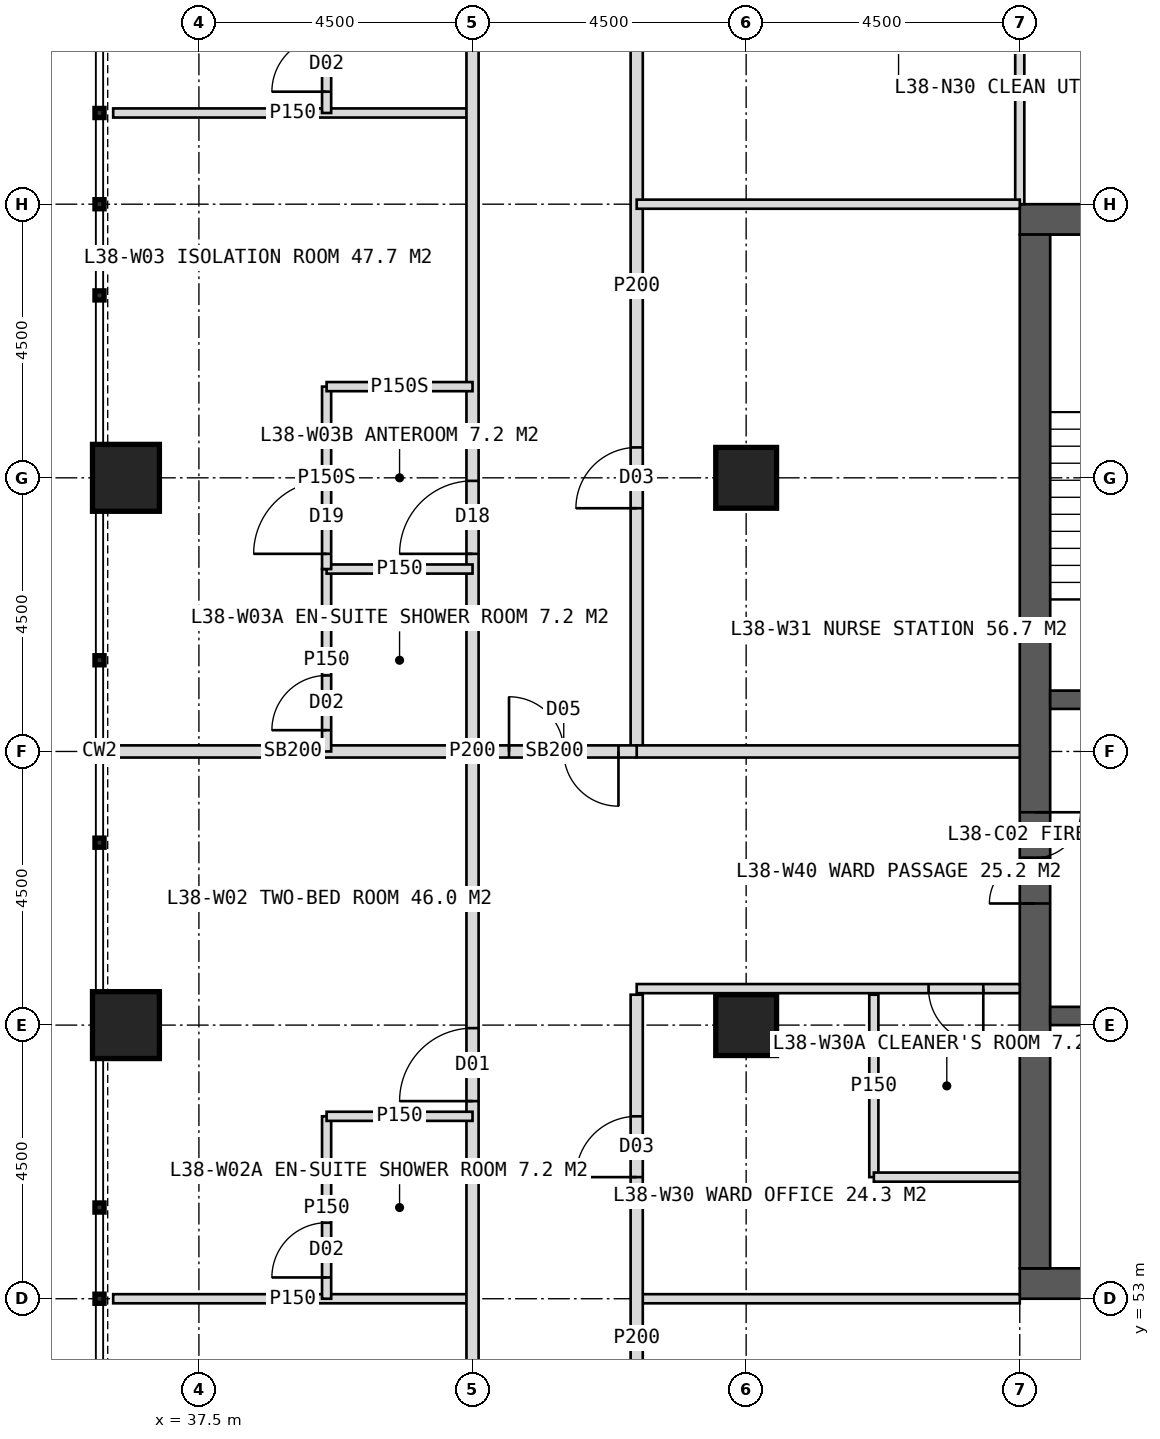
"""IFC4 building model, lengths in metres.
Left out: names, types, materials, properties, quantities, classifications, styles, units other than length and angle.
Written with IfcOpenShell. Run it as: python <this file> out.ifc"""

import sys

from ifc_helpers import new_model, si_unit, direction, frame, frame_2d, origin, origin_2d, place, context, subcontext, project, spatial, rectangle, hollow_rectangle, extrude, element, fill, save


model = new_model("IFC4")
c1 = context("Model", 3, precision=1e-05, world=origin(), true_north=direction((0.0, 1.0)))
c2 = subcontext(c1, "Body", "Model", "MODEL_VIEW")
j1 = project(units=[si_unit("LENGTHUNIT", "METRE"), si_unit("PLANEANGLEUNIT", "RADIAN")], contexts=[c1])
p1 = place(None, origin())
s1 = spatial("IfcSite", under=j1, at=p1, CompositionType="ELEMENT")
p2 = place(p1, origin())
s2 = spatial("IfcBuilding", under=s1, at=p2, CompositionType="ELEMENT")
p3 = place(p2, frame((0.0, 0.0, 160.0)))
s3 = spatial("IfcBuildingStorey", under=s2, at=p3, CompositionType="ELEMENT", Elevation=160.0)
p4 = place(p3, frame((51.0, 70.75, 0.0), z_axis=(0.0, 0.0, 1.0), x_axis=(1.0, 0.0, 0.0)))
e1 = element("IfcWall", 1, at=p4, inside=s3, PredefinedType="SHEAR", context=c2, shape_type="SweptSolid", body=[
    extrude(rectangle(XDim=18.0, YDim=0.5, at=frame_2d((9.0, 0.0))), origin(), (0.0, 0.0, 1.0), 4.0),
])
p5 = place(p4, frame((8.1, 0.0, 0.0)))
e2 = element("IfcOpeningElement", 2, at=p5, cuts=e1, PredefinedType="OPENING", context=c2, shape_type="SweptSolid", body=[
    extrude(rectangle(XDim=1.8, YDim=2.2, at=frame_2d((0.9, 1.1))), frame((0.0, 0.26, 0.0), z_axis=(0.0, -1.0, 0.0), x_axis=(1.0, 0.0, 0.0)), (0.0, 0.0, 1.0), 0.52),
])
p6 = place(p3, frame((51.0, 53.25, 0.0), z_axis=(0.0, 0.0, 1.0), x_axis=(1.0, 0.0, 0.0)))
e3 = element("IfcWall", 3, at=p6, inside=s3, PredefinedType="SHEAR", context=c2, shape_type="SweptSolid", body=[
    extrude(rectangle(XDim=18.0, YDim=0.5, at=frame_2d((9.0, 0.0))), origin(), (0.0, 0.0, 1.0), 4.0),
])
p7 = place(p6, frame((8.1, 0.0, 0.0)))
e4 = element("IfcOpeningElement", 4, at=p7, cuts=e3, PredefinedType="OPENING", context=c2, shape_type="SweptSolid", body=[
    extrude(rectangle(XDim=1.8, YDim=2.2, at=frame_2d((0.9, 1.1))), frame((0.0, 0.26, 0.0), z_axis=(0.0, -1.0, 0.0), x_axis=(1.0, 0.0, 0.0)), (0.0, 0.0, 1.0), 0.52),
])
p8 = place(p3, frame((51.25, 53.5, 0.0), z_axis=(0.0, 0.0, 1.0), x_axis=(0.0, 1.0, 0.0)))
e5 = element("IfcWall", 5, at=p8, inside=s3, PredefinedType="SHEAR", context=c2, shape_type="SweptSolid", body=[
    extrude(rectangle(XDim=17.0, YDim=0.5, at=frame_2d((8.5, 0.0))), origin(), (0.0, 0.0, 1.0), 4.0),
])
p9 = place(p8, frame((6.0, 0.0, 0.0)))
e6 = element("IfcOpeningElement", 6, at=p9, cuts=e5, PredefinedType="OPENING", context=c2, shape_type="SweptSolid", body=[
    extrude(rectangle(XDim=1.5, YDim=2.2, at=frame_2d((0.75, 1.1))), frame((0.0, 0.26, 0.0), z_axis=(0.0, -1.0, 0.0), x_axis=(1.0, 0.0, 0.0)), (0.0, 0.0, 1.0), 0.52),
])
p10 = place(p3, frame((51.5, 62.85, 0.0), z_axis=(0.0, 0.0, 1.0), x_axis=(1.0, 0.0, 0.0)))
e7 = element("IfcWall", 7, at=p10, inside=s3, PredefinedType="SHEAR", context=c2, shape_type="SweptSolid", body=[
    extrude(rectangle(XDim=3.3, YDim=0.3, at=frame_2d((1.65, 0.0))), origin(), (0.0, 0.0, 1.0), 4.0),
])
p11 = place(p10, frame((1.05, 0.0, 0.0)))
e8 = element("IfcOpeningElement", 8, at=p11, cuts=e7, PredefinedType="OPENING", context=c2, shape_type="SweptSolid", body=[
    extrude(rectangle(XDim=1.2, YDim=2.1, at=frame_2d((0.6, 1.05))), frame((0.0, 0.16, 0.0), z_axis=(0.0, -1.0, 0.0), x_axis=(1.0, 0.0, 0.0)), (0.0, 0.0, 1.0), 0.32),
])
p12 = place(p3, frame((51.5, 57.65, 0.0), z_axis=(0.0, 0.0, 1.0), x_axis=(1.0, 0.0, 0.0)))
e9 = element("IfcWall", 9, at=p12, inside=s3, PredefinedType="SHEAR", context=c2, shape_type="SweptSolid", body=[
    extrude(rectangle(XDim=3.3, YDim=0.3, at=frame_2d((1.65, 0.0))), origin(), (0.0, 0.0, 1.0), 4.0),
])
p13 = place(p12, frame((1.05, 0.0, 0.0)))
e10 = element("IfcOpeningElement", 10, at=p13, cuts=e9, PredefinedType="OPENING", context=c2, shape_type="SweptSolid", body=[
    extrude(rectangle(XDim=1.2, YDim=2.2, at=frame_2d((0.6, 1.1))), frame((0.0, 0.16, 0.0), z_axis=(0.0, -1.0, 0.0), x_axis=(1.0, 0.0, 0.0)), (0.0, 0.0, 1.0), 0.32),
])
for number, where, z_axis, x_axis in (
    (11, (46.5, 57.5, 0.0), (0.0, 0.0, 1.0), (1.0, 0.0, 0.0)),
    (12, (46.5, 66.5, 0.0), (0.0, 0.0, 1.0), (1.0, 0.0, 0.0)),
):
    element("IfcColumn", number, at=place(p3, frame(where, z_axis=z_axis, x_axis=x_axis)), inside=s3, PredefinedType="COLUMN", context=c2, shape_type="SweptSolid", body=[
        extrude(hollow_rectangle(XDim=1.0, YDim=1.0, WallThickness=0.1, at=origin_2d()), origin(), (0.0, 0.0, 1.0), 4.0),
    ])
for number, where, z_axis, x_axis in (
    (13, (36.3, 57.5, 0.0), (0.0, 0.0, 1.0), (1.0, 0.0, 0.0)),
    (14, (36.3, 66.5, 0.0), (0.0, 0.0, 1.0), (1.0, 0.0, 0.0)),
):
    element("IfcColumn", number, at=place(p3, frame(where, z_axis=z_axis, x_axis=x_axis)), inside=s3, PredefinedType="COLUMN", context=c2, shape_type="SweptSolid", body=[
        extrude(hollow_rectangle(XDim=1.1, YDim=1.1, WallThickness=0.1, at=origin_2d()), origin(), (0.0, 0.0, 1.0), 4.0),
    ])
p14 = place(p3, frame((51.0, 71.0, 0.0), z_axis=(0.0, 0.0, 1.0), x_axis=(0.0, 1.0, 0.0)))
e15 = element("IfcWall", 15, at=p14, inside=s3, PredefinedType="PARTITIONING", context=c2, shape_type="SweptSolid", body=[
    extrude(rectangle(XDim=6.3, YDim=0.15, at=frame_2d((3.15, 0.0))), origin(), (0.0, 0.0, 1.0), 3.75),
])
p15 = place(p3, frame((42.0, 53.0, 0.0), z_axis=(0.0, 0.0, 1.0), x_axis=(-1.0, 0.0, 0.0)))
e16 = element("IfcWall", 16, at=p15, inside=s3, PredefinedType="PARTITIONING", context=c2, shape_type="SweptSolid", body=[
    extrude(rectangle(XDim=5.91, YDim=0.15, at=frame_2d((2.955, 0.0))), origin(), (0.0, 0.0, 1.0), 3.75),
])
p16 = place(p3, frame((42.0, 62.0, 0.0), z_axis=(0.0, 0.0, 1.0), x_axis=(-1.0, 0.0, 0.0)))
e17 = element("IfcWall", 17, at=p16, inside=s3, PredefinedType="SOLIDWALL", context=c2, shape_type="SweptSolid", body=[
    extrude(rectangle(XDim=5.91, YDim=0.2, at=frame_2d((2.955, 0.0))), origin(), (0.0, 0.0, 1.0), 2.95),
])
p17 = place(p3, frame((42.0, 72.5, 0.0), z_axis=(0.0, 0.0, 1.0), x_axis=(-1.0, 0.0, 0.0)))
e18 = element("IfcWall", 18, at=p17, inside=s3, PredefinedType="PARTITIONING", context=c2, shape_type="SweptSolid", body=[
    extrude(rectangle(XDim=5.91, YDim=0.15, at=frame_2d((2.955, 0.0))), origin(), (0.0, 0.0, 1.0), 3.75),
])
p18 = place(p3, frame((42.0, 44.0, 0.0), z_axis=(0.0, 0.0, 1.0), x_axis=(0.0, 1.0, 0.0)))
e19 = element("IfcWall", 19, at=p18, inside=s3, PredefinedType="PARTITIONING", context=c2, shape_type="SweptSolid", body=[
    extrude(rectangle(XDim=36.0, YDim=0.2, at=frame_2d((18.0, 0.0))), origin(), (0.0, 0.0, 1.0), 3.75),
])
p19 = place(p18, frame((3.25, 0.0, 0.0)))
e20 = element("IfcOpeningElement", 20, at=p19, cuts=e19, PredefinedType="OPENING", context=c2, shape_type="SweptSolid", body=[
    extrude(rectangle(XDim=1.2, YDim=2.2, at=frame_2d((0.6, 1.1))), frame((0.0, 0.11, 0.0), z_axis=(0.0, -1.0, 0.0), x_axis=(1.0, 0.0, 0.0)), (0.0, 0.0, 1.0), 0.22),
])
p20 = place(p18, frame((12.25, 0.0, 0.0)))
e21 = element("IfcOpeningElement", 21, at=p20, cuts=e19, PredefinedType="OPENING", context=c2, shape_type="SweptSolid", body=[
    extrude(rectangle(XDim=1.2, YDim=2.2, at=frame_2d((0.6, 1.1))), frame((0.0, 0.11, 0.0), z_axis=(0.0, -1.0, 0.0), x_axis=(1.0, 0.0, 0.0)), (0.0, 0.0, 1.0), 0.22),
])
p21 = place(p18, frame((21.25, 0.0, 0.0)))
e22 = element("IfcOpeningElement", 22, at=p21, cuts=e19, PredefinedType="OPENING", context=c2, shape_type="SweptSolid", body=[
    extrude(rectangle(XDim=1.2, YDim=2.2, at=frame_2d((0.6, 1.1))), frame((0.0, 0.11, 0.0), z_axis=(0.0, -1.0, 0.0), x_axis=(1.0, 0.0, 0.0)), (0.0, 0.0, 1.0), 0.22),
])
p22 = place(p18, frame((31.75, 0.0, 0.0)))
e23 = element("IfcOpeningElement", 23, at=p22, cuts=e19, PredefinedType="OPENING", context=c2, shape_type="SweptSolid", body=[
    extrude(rectangle(XDim=1.2, YDim=2.2, at=frame_2d((0.6, 1.1))), frame((0.0, 0.11, 0.0), z_axis=(0.0, -1.0, 0.0), x_axis=(1.0, 0.0, 0.0)), (0.0, 0.0, 1.0), 0.22),
])
p23 = place(p3, frame((39.6, 53.0, 0.0), z_axis=(0.0, 0.0, 1.0), x_axis=(0.0, 1.0, 0.0)))
e24 = element("IfcWall", 24, at=p23, inside=s3, PredefinedType="PARTITIONING", context=c2, shape_type="SweptSolid", body=[
    extrude(rectangle(XDim=3.0, YDim=0.15, at=frame_2d((1.5, 0.0))), origin(), (0.0, 0.0, 1.0), 3.75),
])
p24 = place(p23, frame((0.35, 0.0, 0.0)))
e25 = element("IfcOpeningElement", 25, at=p24, cuts=e24, PredefinedType="OPENING", context=c2, shape_type="SweptSolid", body=[
    extrude(rectangle(XDim=0.9, YDim=2.1, at=frame_2d((0.45, 1.05))), frame((0.0, 0.085, 0.0), z_axis=(0.0, -1.0, 0.0), x_axis=(1.0, 0.0, 0.0)), (0.0, 0.0, 1.0), 0.17),
])
p25 = place(p3, frame((42.0, 56.0, 0.0), z_axis=(0.0, 0.0, 1.0), x_axis=(-1.0, 0.0, 0.0)))
e26 = element("IfcWall", 26, at=p25, inside=s3, PredefinedType="PARTITIONING", context=c2, shape_type="SweptSolid", body=[
    extrude(rectangle(XDim=2.4, YDim=0.15, at=frame_2d((1.2, 0.0))), origin(), (0.0, 0.0, 1.0), 3.75),
])
p26 = place(p3, frame((39.6, 62.0, 0.0), z_axis=(0.0, 0.0, 1.0), x_axis=(0.0, 1.0, 0.0)))
e27 = element("IfcWall", 27, at=p26, inside=s3, PredefinedType="PARTITIONING", context=c2, shape_type="SweptSolid", body=[
    extrude(rectangle(XDim=3.0, YDim=0.15, at=frame_2d((1.5, 0.0))), origin(), (0.0, 0.0, 1.0), 3.75),
])
p27 = place(p26, frame((0.35, 0.0, 0.0)))
e28 = element("IfcOpeningElement", 28, at=p27, cuts=e27, PredefinedType="OPENING", context=c2, shape_type="SweptSolid", body=[
    extrude(rectangle(XDim=0.9, YDim=2.1, at=frame_2d((0.45, 1.05))), frame((0.0, 0.085, 0.0), z_axis=(0.0, -1.0, 0.0), x_axis=(1.0, 0.0, 0.0)), (0.0, 0.0, 1.0), 0.17),
])
p28 = place(p3, frame((42.0, 65.0, 0.0), z_axis=(0.0, 0.0, 1.0), x_axis=(-1.0, 0.0, 0.0)))
e29 = element("IfcWall", 29, at=p28, inside=s3, PredefinedType="PARTITIONING", context=c2, shape_type="SweptSolid", body=[
    extrude(rectangle(XDim=2.4, YDim=0.15, at=frame_2d((1.2, 0.0))), origin(), (0.0, 0.0, 1.0), 3.75),
])
p29 = place(p3, frame((39.6, 65.0, 0.0), z_axis=(0.0, 0.0, 1.0), x_axis=(0.0, 1.0, 0.0)))
e30 = element("IfcWall", 30, at=p29, inside=s3, PredefinedType="PARTITIONING", context=c2, shape_type="SweptSolid", body=[
    extrude(rectangle(XDim=3.0, YDim=0.15, at=frame_2d((1.5, 0.0))), origin(), (0.0, 0.0, 1.0), 3.75),
])
p30 = place(p29, frame((0.25, 0.0, 0.0)))
e31 = element("IfcOpeningElement", 31, at=p30, cuts=e30, PredefinedType="OPENING", context=c2, shape_type="SweptSolid", body=[
    extrude(rectangle(XDim=1.2, YDim=2.2, at=frame_2d((0.6, 1.1))), frame((0.0, 0.085, 0.0), z_axis=(0.0, -1.0, 0.0), x_axis=(1.0, 0.0, 0.0)), (0.0, 0.0, 1.0), 0.17),
])
p31 = place(p3, frame((42.0, 68.0, 0.0), z_axis=(0.0, 0.0, 1.0), x_axis=(-1.0, 0.0, 0.0)))
e32 = element("IfcWall", 32, at=p31, inside=s3, PredefinedType="PARTITIONING", context=c2, shape_type="SweptSolid", body=[
    extrude(rectangle(XDim=2.4, YDim=0.15, at=frame_2d((1.2, 0.0))), origin(), (0.0, 0.0, 1.0), 3.75),
])
p32 = place(p3, frame((39.6, 72.5, 0.0), z_axis=(0.0, 0.0, 1.0), x_axis=(0.0, 1.0, 0.0)))
e33 = element("IfcWall", 33, at=p32, inside=s3, PredefinedType="PARTITIONING", context=c2, shape_type="SweptSolid", body=[
    extrude(rectangle(XDim=3.0, YDim=0.15, at=frame_2d((1.5, 0.0))), origin(), (0.0, 0.0, 1.0), 3.75),
])
p33 = place(p32, frame((0.35, 0.0, 0.0)))
e34 = element("IfcOpeningElement", 34, at=p33, cuts=e33, PredefinedType="OPENING", context=c2, shape_type="SweptSolid", body=[
    extrude(rectangle(XDim=0.9, YDim=2.1, at=frame_2d((0.45, 1.05))), frame((0.0, 0.085, 0.0), z_axis=(0.0, -1.0, 0.0), x_axis=(1.0, 0.0, 0.0)), (0.0, 0.0, 1.0), 0.17),
])
p34 = place(p3, frame((51.0, 53.0, 0.0), z_axis=(0.0, 0.0, 1.0), x_axis=(-1.0, 0.0, 0.0)))
e35 = element("IfcWall", 35, at=p34, inside=s3, PredefinedType="PARTITIONING", context=c2, shape_type="SweptSolid", body=[
    extrude(rectangle(XDim=6.3, YDim=0.15, at=frame_2d((3.15, 0.0))), origin(), (0.0, 0.0, 1.0), 3.75),
])
p35 = place(p3, frame((44.7, 46.7, 0.0), z_axis=(0.0, 0.0, 1.0), x_axis=(0.0, 1.0, 0.0)))
e36 = element("IfcWall", 36, at=p35, inside=s3, PredefinedType="PARTITIONING", context=c2, shape_type="SweptSolid", body=[
    extrude(rectangle(XDim=11.3, YDim=0.2, at=frame_2d((5.65, 0.0))), origin(), (0.0, 0.0, 1.0), 3.75),
])
p36 = place(p35, frame((8.3, 0.0, 0.0)))
e37 = element("IfcOpeningElement", 37, at=p36, cuts=e36, PredefinedType="OPENING", context=c2, shape_type="SweptSolid", body=[
    extrude(rectangle(XDim=1.0, YDim=2.1, at=frame_2d((0.5, 1.05))), frame((0.0, 0.11, 0.0), z_axis=(0.0, -1.0, 0.0), x_axis=(1.0, 0.0, 0.0)), (0.0, 0.0, 1.0), 0.22),
])
p37 = place(p3, frame((44.7, 62.0, 0.0), z_axis=(0.0, 0.0, 1.0), x_axis=(0.0, 1.0, 0.0)))
e38 = element("IfcWall", 38, at=p37, inside=s3, PredefinedType="PARTITIONING", context=c2, shape_type="SweptSolid", body=[
    extrude(rectangle(XDim=15.3, YDim=0.2, at=frame_2d((7.65, 0.0))), origin(), (0.0, 0.0, 1.0), 3.75),
])
p38 = place(p37, frame((4.0, 0.0, 0.0)))
e39 = element("IfcOpeningElement", 39, at=p38, cuts=e38, PredefinedType="OPENING", context=c2, shape_type="SweptSolid", body=[
    extrude(rectangle(XDim=1.0, YDim=2.1, at=frame_2d((0.5, 1.05))), frame((0.0, 0.11, 0.0), z_axis=(0.0, -1.0, 0.0), x_axis=(1.0, 0.0, 0.0)), (0.0, 0.0, 1.0), 0.22),
])
p39 = place(p37, frame((11.65, 0.0, 0.0)))
e40 = element("IfcOpeningElement", 40, at=p39, cuts=e38, PredefinedType="OPENING", context=c2, shape_type="SweptSolid", body=[
    extrude(rectangle(XDim=1.0, YDim=2.1, at=frame_2d((0.5, 1.05))), frame((0.0, 0.11, 0.0), z_axis=(0.0, -1.0, 0.0), x_axis=(1.0, 0.0, 0.0)), (0.0, 0.0, 1.0), 0.22),
])
p40 = place(p3, frame((51.0, 58.1, 0.0), z_axis=(0.0, 0.0, 1.0), x_axis=(-1.0, 0.0, 0.0)))
e41 = element("IfcWall", 41, at=p40, inside=s3, PredefinedType="PARTITIONING", context=c2, shape_type="SweptSolid", body=[
    extrude(rectangle(XDim=6.3, YDim=0.15, at=frame_2d((3.15, 0.0))), origin(), (0.0, 0.0, 1.0), 3.75),
])
p41 = place(p40, frame((0.6, 0.0, 0.0)))
e42 = element("IfcOpeningElement", 42, at=p41, cuts=e41, PredefinedType="OPENING", context=c2, shape_type="SweptSolid", body=[
    extrude(rectangle(XDim=0.9, YDim=2.1, at=frame_2d((0.45, 1.05))), frame((0.0, 0.085, 0.0), z_axis=(0.0, -1.0, 0.0), x_axis=(1.0, 0.0, 0.0)), (0.0, 0.0, 1.0), 0.17),
])
p42 = place(p3, frame((51.0, 62.0, 0.0), z_axis=(0.0, 0.0, 1.0), x_axis=(-1.0, 0.0, 0.0)))
e43 = element("IfcWall", 43, at=p42, inside=s3, PredefinedType="SOLIDWALL", context=c2, shape_type="SweptSolid", body=[
    extrude(rectangle(XDim=6.3, YDim=0.2, at=frame_2d((3.15, 0.0))), origin(), (0.0, 0.0, 1.0), 2.95),
])
p43 = place(p3, frame((51.0, 71.0, 0.0), z_axis=(0.0, 0.0, 1.0), x_axis=(-1.0, 0.0, 0.0)))
e44 = element("IfcWall", 44, at=p43, inside=s3, PredefinedType="PARTITIONING", context=c2, shape_type="SweptSolid", body=[
    extrude(rectangle(XDim=6.3, YDim=0.15, at=frame_2d((3.15, 0.0))), origin(), (0.0, 0.0, 1.0), 3.75),
])
p44 = place(p3, frame((48.6, 55.0, 0.0), z_axis=(0.0, 0.0, 1.0), x_axis=(0.0, 1.0, 0.0)))
e45 = element("IfcWall", 45, at=p44, inside=s3, PredefinedType="PARTITIONING", context=c2, shape_type="SweptSolid", body=[
    extrude(rectangle(XDim=3.0, YDim=0.15, at=frame_2d((1.5, 0.0))), origin(), (0.0, 0.0, 1.0), 3.75),
])
p45 = place(p3, frame((51.0, 55.0, 0.0), z_axis=(0.0, 0.0, 1.0), x_axis=(-1.0, 0.0, 0.0)))
e46 = element("IfcWall", 46, at=p45, inside=s3, PredefinedType="PARTITIONING", context=c2, shape_type="SweptSolid", body=[
    extrude(rectangle(XDim=2.4, YDim=0.15, at=frame_2d((1.2, 0.0))), origin(), (0.0, 0.0, 1.0), 3.75),
])
p46 = place(p3, frame((44.7, 62.0, 0.0), z_axis=(0.0, 0.0, 1.0), x_axis=(-1.0, 0.0, 0.0)))
e47 = element("IfcWall", 47, at=p46, inside=s3, PredefinedType="SOLIDWALL", context=c2, shape_type="SweptSolid", body=[
    extrude(rectangle(XDim=2.7, YDim=0.2, at=frame_2d((1.35, 0.0))), origin(), (0.0, 0.0, 1.0), 2.95),
])
p47 = place(p46, frame((0.3, 0.0, 0.0)))
e48 = element("IfcOpeningElement", 48, at=p47, cuts=e47, PredefinedType="OPENING", context=c2, shape_type="SweptSolid", body=[
    extrude(rectangle(XDim=1.8, YDim=2.2, at=frame_2d((0.9, 1.1))), frame((0.0, 0.11, 0.0), z_axis=(0.0, -1.0, 0.0), x_axis=(1.0, 0.0, 0.0)), (0.0, 0.0, 1.0), 0.22),
])
p48 = place(p20, origin())
e49 = element("IfcDoor", 49, at=p48, inside=s3, OperationType="SINGLE_SWING_LEFT", PredefinedType="DOOR", context=c2, shape_type="SweptSolid", body=[
    extrude(rectangle(XDim=1.2, YDim=2.2, at=frame_2d((0.6, 1.1))), frame((0.0, 0.025, 0.0), z_axis=(0.0, -1.0, 0.0), x_axis=(1.0, 0.0, 0.0)), (0.0, 0.0, 1.0), 0.05),
])
fill(e21, e49)
p49 = place(p24, origin())
e50 = element("IfcDoor", 50, at=p49, inside=s3, OperationType="SINGLE_SWING_LEFT", PredefinedType="DOOR", context=c2, shape_type="SweptSolid", body=[
    extrude(rectangle(XDim=0.9, YDim=2.1, at=frame_2d((0.45, 1.05))), frame((0.0, 0.025, 0.0), z_axis=(0.0, -1.0, 0.0), x_axis=(1.0, 0.0, 0.0)), (0.0, 0.0, 1.0), 0.05),
])
fill(e25, e50)
p50 = place(p30, origin())
e51 = element("IfcDoor", 51, at=p50, inside=s3, OperationType="SINGLE_SWING_LEFT", PredefinedType="DOOR", context=c2, shape_type="SweptSolid", body=[
    extrude(rectangle(XDim=1.2, YDim=2.2, at=frame_2d((0.6, 1.1))), frame((0.0, 0.025, 0.0), z_axis=(0.0, -1.0, 0.0), x_axis=(1.0, 0.0, 0.0)), (0.0, 0.0, 1.0), 0.05),
])
fill(e31, e51)
p51 = place(p21, origin())
e52 = element("IfcDoor", 52, at=p51, inside=s3, OperationType="SINGLE_SWING_LEFT", PredefinedType="DOOR", context=c2, shape_type="SweptSolid", body=[
    extrude(rectangle(XDim=1.2, YDim=2.2, at=frame_2d((0.6, 1.1))), frame((0.0, 0.025, 0.0), z_axis=(0.0, -1.0, 0.0), x_axis=(1.0, 0.0, 0.0)), (0.0, 0.0, 1.0), 0.05),
])
fill(e22, e52)
p52 = place(p27, origin())
e53 = element("IfcDoor", 53, at=p52, inside=s3, OperationType="SINGLE_SWING_LEFT", PredefinedType="DOOR", context=c2, shape_type="SweptSolid", body=[
    extrude(rectangle(XDim=0.9, YDim=2.1, at=frame_2d((0.45, 1.05))), frame((0.0, 0.025, 0.0), z_axis=(0.0, -1.0, 0.0), x_axis=(1.0, 0.0, 0.0)), (0.0, 0.0, 1.0), 0.05),
])
fill(e28, e53)
p53 = place(p33, origin())
e54 = element("IfcDoor", 54, at=p53, inside=s3, OperationType="SINGLE_SWING_LEFT", PredefinedType="DOOR", context=c2, shape_type="SweptSolid", body=[
    extrude(rectangle(XDim=0.9, YDim=2.1, at=frame_2d((0.45, 1.05))), frame((0.0, 0.025, 0.0), z_axis=(0.0, -1.0, 0.0), x_axis=(1.0, 0.0, 0.0)), (0.0, 0.0, 1.0), 0.05),
])
fill(e34, e54)
p54 = place(p41, origin())
e55 = element("IfcDoor", 55, at=p54, inside=s3, OperationType="SINGLE_SWING_LEFT", PredefinedType="DOOR", context=c2, shape_type="SweptSolid", body=[
    extrude(rectangle(XDim=0.9, YDim=2.1, at=frame_2d((0.45, 1.05))), frame((0.0, 0.025, 0.0), z_axis=(0.0, -1.0, 0.0), x_axis=(1.0, 0.0, 0.0)), (0.0, 0.0, 1.0), 0.05),
])
fill(e42, e55)
p55 = place(p36, origin())
e56 = element("IfcDoor", 56, at=p55, inside=s3, OperationType="SINGLE_SWING_LEFT", PredefinedType="DOOR", context=c2, shape_type="SweptSolid", body=[
    extrude(rectangle(XDim=1.0, YDim=2.1, at=frame_2d((0.5, 1.05))), frame((0.0, 0.025, 0.0), z_axis=(0.0, -1.0, 0.0), x_axis=(1.0, 0.0, 0.0)), (0.0, 0.0, 1.0), 0.05),
])
fill(e37, e56)
p56 = place(p38, origin())
e57 = element("IfcDoor", 57, at=p56, inside=s3, OperationType="SINGLE_SWING_LEFT", PredefinedType="DOOR", context=c2, shape_type="SweptSolid", body=[
    extrude(rectangle(XDim=1.0, YDim=2.1, at=frame_2d((0.5, 1.05))), frame((0.0, 0.025, 0.0), z_axis=(0.0, -1.0, 0.0), x_axis=(1.0, 0.0, 0.0)), (0.0, 0.0, 1.0), 0.05),
])
fill(e39, e57)
p57 = place(p47, origin())
e58 = element("IfcDoor", 58, at=p57, inside=s3, OperationType="DOUBLE_DOOR_DOUBLE_SWING", PredefinedType="DOOR", context=c2, shape_type="SweptSolid", body=[
    extrude(rectangle(XDim=1.8, YDim=2.2, at=frame_2d((0.9, 1.1))), frame((0.0, 0.025, 0.0), z_axis=(0.0, -1.0, 0.0), x_axis=(1.0, 0.0, 0.0)), (0.0, 0.0, 1.0), 0.05),
])
fill(e48, e58)
p58 = place(p9, origin())
e59 = element("IfcDoor", 59, at=p58, inside=s3, OperationType="DOUBLE_DOOR_SINGLE_SWING", PredefinedType="DOOR", context=c2, shape_type="SweptSolid", body=[
    extrude(rectangle(XDim=1.5, YDim=2.2, at=frame_2d((0.75, 1.1))), frame((0.0, 0.025, 0.0), z_axis=(0.0, -1.0, 0.0), x_axis=(1.0, 0.0, 0.0)), (0.0, 0.0, 1.0), 0.05),
])
fill(e6, e59)
save(model, sys.argv[1])
